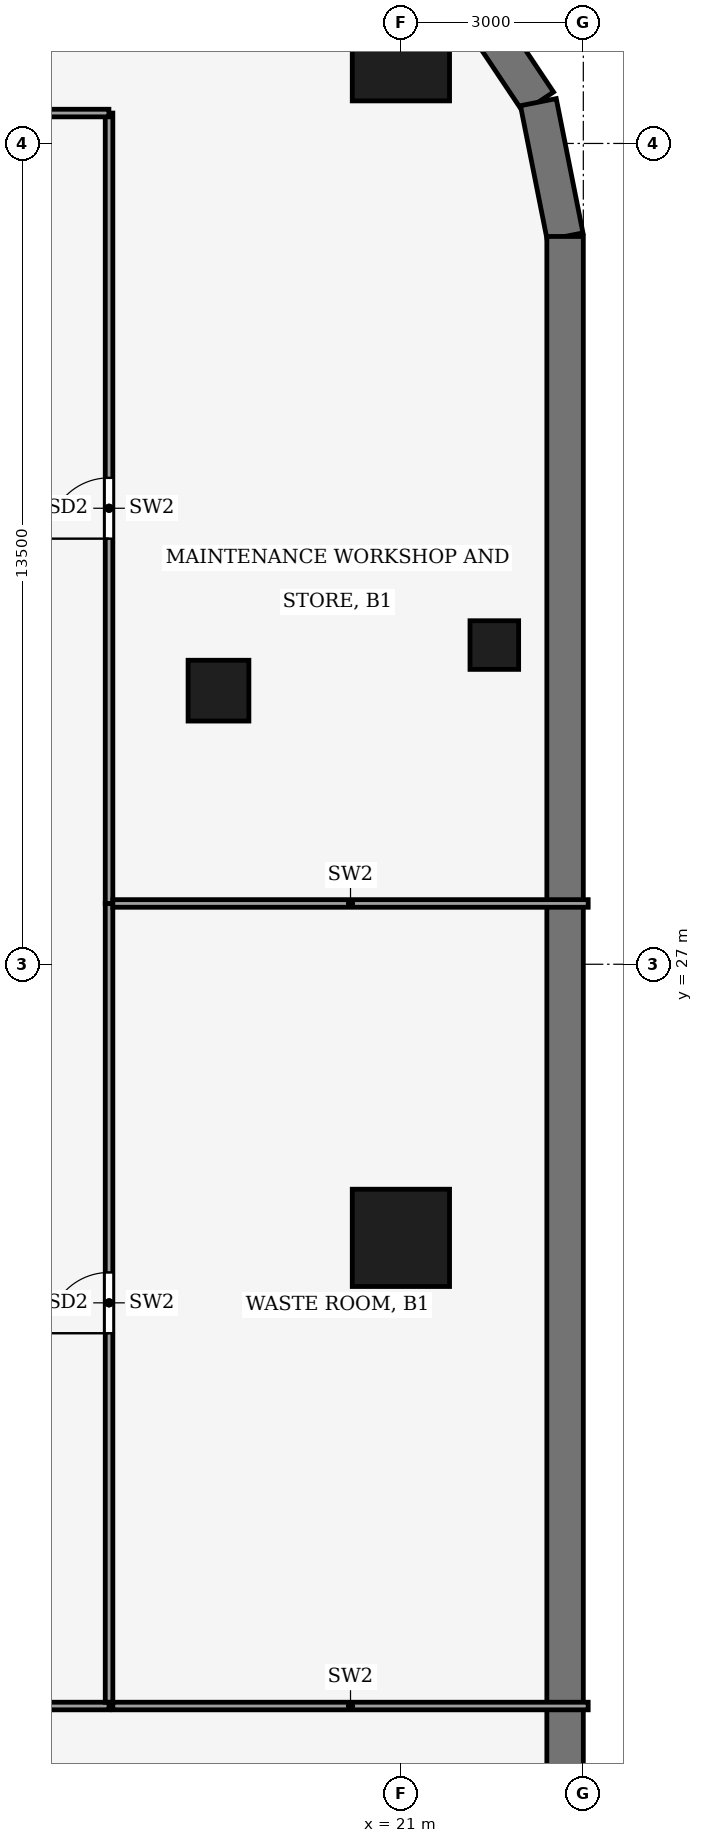
"""IFC4 building model, lengths in metres.
Left out: names, types, materials, properties, quantities, classifications, styles, units other than length and angle.
Written with IfcOpenShell. Run it as: python <this file> out.ifc"""

import sys

from ifc_helpers import new_model, si_unit, direction, frame, frame_2d, origin, origin_2d, place, context, subcontext, project, spatial, rectangle, hollow_rectangle, extrude, element, fill, save


model = new_model("IFC4")
c1 = context("Model", 3, precision=1e-05, world=origin(), true_north=direction((0.0, 1.0)))
c2 = subcontext(c1, "Body", "Model", "MODEL_VIEW")
j1 = project(units=[si_unit("LENGTHUNIT", "METRE"), si_unit("PLANEANGLEUNIT", "RADIAN")], contexts=[c1])
p1 = place(None, origin())
s1 = spatial("IfcSite", under=j1, at=p1, CompositionType="ELEMENT")
p2 = place(p1, origin())
s2 = spatial("IfcBuilding", under=s1, at=p2, CompositionType="ELEMENT")
p3 = place(p2, frame((0.0, 0.0, -6.0)))
s3 = spatial("IfcBuildingStorey", under=s2, at=p3, CompositionType="ELEMENT", Elevation=-6.0)
p4 = place(p3, frame((22.026, 43.026, 0.0), z_axis=(0.0, 0.0, 1.0), x_axis=(0.555562047437, -0.831475081676, 0.0)))
e1 = element("IfcWall", 1, at=p4, inside=s3, PredefinedType="SHEAR", context=c2, shape_type="SweptSolid", body=[
    extrude(rectangle(XDim=2.222, YDim=0.6, at=frame_2d((1.111, 0.0))), origin(), (0.0, 0.0, 1.0), 5.55),
])
p5 = place(p3, frame((23.261, 41.179, 0.0), z_axis=(0.0, 0.0, 1.0), x_axis=(0.195052642224, -0.980792774628, 0.0)))
e2 = element("IfcWall", 2, at=p5, inside=s3, PredefinedType="SHEAR", context=c2, shape_type="SweptSolid", body=[
    extrude(rectangle(XDim=2.252, YDim=0.6, at=frame_2d((1.126, 0.0))), origin(), (0.0, 0.0, 1.0), 5.55),
])
p6 = place(p3, frame((23.7, 38.97, 0.0), z_axis=(0.0, 0.0, 1.0), x_axis=(0.0, -1.0, 0.0)))
e3 = element("IfcWall", 3, at=p6, inside=s3, PredefinedType="SHEAR", context=c2, shape_type="SweptSolid", body=[
    extrude(rectangle(XDim=38.941, YDim=0.6, at=frame_2d((19.47, 0.0))), origin(), (0.0, 0.0, 1.0), 5.55),
])
for number, where, z_axis, x_axis in (
    (4, (21.0, 42.0, 0.0), (0.0, 0.0, 1.0), (1.0, 0.0, 0.0)),
    (5, (21.0, 22.5, 0.0), (0.0, 0.0, 1.0), (1.0, 0.0, 0.0)),
):
    element("IfcColumn", number, at=place(p3, frame(where, z_axis=z_axis, x_axis=x_axis)), inside=s3, PredefinedType="COLUMN", context=c2, shape_type="SweptSolid", body=[
        extrude(hollow_rectangle(XDim=1.6, YDim=1.6, WallThickness=0.09, at=origin_2d()), origin(), (0.0, 0.0, 1.0), 6.0),
    ])
p7 = place(p3, frame((22.536, 32.25, 0.0), z_axis=(0.0, 0.0, 1.0), x_axis=(1.0, 0.0, 0.0)))
e6 = element("IfcColumn", 6, at=p7, inside=s3, PredefinedType="COLUMN", context=c2, shape_type="SweptSolid", body=[
    extrude(hollow_rectangle(XDim=0.8, YDim=0.8, WallThickness=0.04, at=origin_2d()), origin(), (0.0, 0.0, 1.0), 6.0),
])
p8 = place(p3, frame((18.0, 31.5, 0.0), z_axis=(0.0, 0.0, 1.0), x_axis=(1.0, 0.0, 0.0)))
e7 = element("IfcColumn", 7, at=p8, inside=s3, PredefinedType="COLUMN", context=c2, shape_type="SweptSolid", body=[
    extrude(rectangle(XDim=1.0, YDim=1.0, at=origin_2d()), origin(), (0.0, 0.0, 1.0), 6.0),
])
p9 = place(p3, frame((16.2, 14.8, 0.0), z_axis=(0.0, 0.0, 1.0), x_axis=(-1.0, 0.0, 0.0)))
e8 = element("IfcWall", 8, at=p9, inside=s3, PredefinedType="PARTITIONING", context=c2, shape_type="SweptSolid", body=[
    extrude(rectangle(XDim=4.2, YDim=0.125, at=frame_2d((2.1, 0.0))), origin(), (0.0, 0.0, 1.0), 5.55),
])
p10 = place(p3, frame((16.2, 14.863, 0.0), z_axis=(0.0, 0.0, 1.0), x_axis=(0.0, 1.0, 0.0)))
e9 = element("IfcWall", 9, at=p10, inside=s3, PredefinedType="PARTITIONING", context=c2, shape_type="SweptSolid", body=[
    extrude(rectangle(XDim=13.137, YDim=0.125, at=frame_2d((6.569, 0.0))), origin(), (0.0, 0.0, 1.0), 5.55),
])
p11 = place(p10, frame((6.069, 0.0, 0.0)))
e10 = element("IfcOpeningElement", 10, at=p11, cuts=e9, PredefinedType="OPENING", context=c2, shape_type="SweptSolid", body=[
    extrude(rectangle(XDim=1.0, YDim=2.1, at=frame_2d((0.5, 1.05))), frame((0.0, 0.073, 0.0), z_axis=(0.0, -1.0, 0.0), x_axis=(1.0, 0.0, 0.0)), (0.0, 0.0, 1.0), 0.145),
])
p12 = place(p3, frame((16.2, 28.0, 0.0), z_axis=(0.0, 0.0, 1.0), x_axis=(0.0, 1.0, 0.0)))
e11 = element("IfcWall", 11, at=p12, inside=s3, PredefinedType="PARTITIONING", context=c2, shape_type="SweptSolid", body=[
    extrude(rectangle(XDim=13.0, YDim=0.125, at=frame_2d((6.5, 0.0))), origin(), (0.0, 0.0, 1.0), 5.55),
])
p13 = place(p12, frame((6.0, 0.0, 0.0)))
e12 = element("IfcOpeningElement", 12, at=p13, cuts=e11, PredefinedType="OPENING", context=c2, shape_type="SweptSolid", body=[
    extrude(rectangle(XDim=1.0, YDim=2.1, at=frame_2d((0.5, 1.05))), frame((0.0, 0.073, 0.0), z_axis=(0.0, -1.0, 0.0), x_axis=(1.0, 0.0, 0.0)), (0.0, 0.0, 1.0), 0.145),
])
for number, where, z_axis, x_axis in (
    (13, (16.262, 14.8, 0.0), (0.0, 0.0, 1.0), (1.0, 0.0, 0.0)),
    (14, (16.262, 28.0, 0.0), (0.0, 0.0, 1.0), (1.0, 0.0, 0.0)),
):
    element("IfcWall", number, at=place(p3, frame(where, z_axis=z_axis, x_axis=x_axis)), inside=s3, PredefinedType="PARTITIONING", context=c2, shape_type="SweptSolid", body=[
        extrude(rectangle(XDim=7.818, YDim=0.125, at=frame_2d((3.909, 0.0))), origin(), (0.0, 0.0, 1.0), 5.55),
    ])
p14 = place(p3, frame((-16.198, 41.0, 0.0), z_axis=(0.0, 0.0, 1.0), x_axis=(1.0, 0.0, 0.0)))
e15 = element("IfcWall", 15, at=p14, inside=s3, PredefinedType="PARTITIONING", context=c2, shape_type="SweptSolid", body=[
    extrude(rectangle(XDim=32.396, YDim=0.125, at=frame_2d((16.198, 0.0))), origin(), (0.0, 0.0, 1.0), 5.55),
])
p15 = place(p11, origin())
e16 = element("IfcDoor", 16, at=p15, inside=s3, OperationType="SINGLE_SWING_LEFT", PredefinedType="DOOR", context=c2, shape_type="SweptSolid", body=[
    extrude(rectangle(XDim=1.0, YDim=2.1, at=frame_2d((0.5, 1.05))), frame((0.0, 0.025, 0.0), z_axis=(0.0, -1.0, 0.0), x_axis=(1.0, 0.0, 0.0)), (0.0, 0.0, 1.0), 0.05),
])
fill(e10, e16)
p16 = place(p13, origin())
e17 = element("IfcDoor", 17, at=p16, inside=s3, OperationType="SINGLE_SWING_RIGHT", PredefinedType="DOOR", context=c2, shape_type="SweptSolid", body=[
    extrude(rectangle(XDim=1.0, YDim=2.1, at=frame_2d((0.5, 1.05))), frame((0.0, 0.025, 0.0), z_axis=(0.0, -1.0, 0.0), x_axis=(1.0, 0.0, 0.0)), (0.0, 0.0, 1.0), 0.05),
])
fill(e12, e17)
save(model, sys.argv[1])
